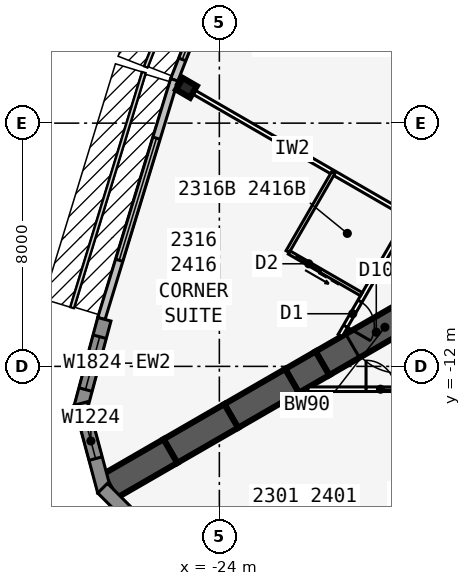
"""IFC4 building model, lengths in metres.
Left out: names, types, materials, properties, quantities, classifications, styles, units other than length and angle.
Written with IfcOpenShell. Run it as: python <this file> out.ifc"""

import sys

from ifc_helpers import new_model, si_unit, direction, frame, frame_2d, origin, origin_2d, place, context, subcontext, project, spatial, polyline, rectangle, i_section, outline, extrude, element, fill, save


model = new_model("IFC4")
c1 = context("Model", 3, precision=1e-05, world=origin(), true_north=direction((0.0, 1.0)))
c2 = subcontext(c1, "Body", "Model", "MODEL_VIEW")
j1 = project(units=[si_unit("LENGTHUNIT", "METRE"), si_unit("PLANEANGLEUNIT", "RADIAN")], contexts=[c1])
p1 = place(None, origin())
s1 = spatial("IfcSite", under=j1, at=p1, CompositionType="ELEMENT")
p2 = place(p1, origin())
s2 = spatial("IfcBuilding", under=s1, at=p2, CompositionType="ELEMENT")
p3 = place(p2, frame((0.0, 0.0, 89.7)))
s3 = spatial("IfcBuildingStorey", under=s2, at=p3, CompositionType="ELEMENT", Elevation=89.7)
p4 = place(p3, frame((-16.5, -9.526, 0.0), z_axis=(0.0, 0.0, 1.0), x_axis=(-0.866031398331, -0.499989616998, 0.0)))
e1 = element("IfcWall", 1, at=p4, inside=s3, PredefinedType="SHEAR", context=c2, shape_type="SweptSolid", body=[
    extrude(rectangle(XDim=4.746, YDim=0.9, at=frame_2d((2.373, 0.0))), origin(), (0.0, 0.0, 1.0), 3.4),
])
p5 = place(p4, frame((1.8, 0.0, 0.0)))
e2 = element("IfcOpeningElement", 2, at=p5, cuts=e1, PredefinedType="OPENING", context=c2, shape_type="SweptSolid", body=[
    extrude(rectangle(XDim=1.8, YDim=2.13, at=frame_2d((0.9, 1.065))), frame((0.0, 0.46, 0.0), z_axis=(0.0, -1.0, 0.0), x_axis=(1.0, 0.0, 0.0)), (0.0, 0.0, 1.0), 0.92),
])
p6 = place(p3, frame((-20.61, -11.899, 0.0), z_axis=(0.0, 0.0, 1.0), x_axis=(-0.866009537788, -0.500027479704, 0.0)))
e3 = element("IfcWall", 3, at=p6, inside=s3, PredefinedType="SHEAR", context=c2, shape_type="SweptSolid", body=[
    extrude(rectangle(XDim=1.155, YDim=0.9, at=frame_2d((0.577, 0.0))), origin(), (0.0, 0.0, 1.0), 3.4),
])
for number, where, z_axis, x_axis in (
    (4, (-21.61, -12.477, 0.0), (0.0, 0.0, 1.0), (-0.866, -0.5, 0.0)),
    (5, (-23.61, -13.631, 0.0), (0.0, 0.0, 1.0), (-0.866, -0.5, 0.0)),
    (6, (-25.61, -14.786, 0.0), (0.0, 0.0, 1.0), (-0.866, -0.5, 0.0)),
):
    element("IfcWall", number, at=place(p3, frame(where, z_axis=z_axis, x_axis=x_axis)), inside=s3, PredefinedType="SHEAR", context=c2, shape_type="SweptSolid", body=[
        extrude(rectangle(XDim=2.309, YDim=0.9, at=frame_2d((1.155, 0.0))), origin(), (0.0, 0.0, 1.0), 3.4),
    ])
p7 = place(p3, frame((-25.083, -2.839, 0.0), z_axis=(0.0, 0.0, 1.0), x_axis=(-0.5, -0.866025403784, 0.0)))
e7 = element("IfcColumn", 7, at=p7, inside=s3, PredefinedType="COLUMN", context=c2, shape_type="SweptSolid", body=[
    extrude(i_section(OverallWidth=0.442, OverallDepth=0.531, WebThickness=0.066, FlangeThickness=0.106, at=origin_2d()), origin(), (0.0, 0.0, 1.0), 3.4),
])
p8 = place(p3, frame((-23.645, 2.126, 0.0), z_axis=(0.0, 0.0, 1.0), x_axis=(-0.364013463868, -0.931393685894, 0.0)))
e8 = element("IfcWall", 8, at=p8, inside=s3, PredefinedType="STANDARD", context=c2, shape_type="SweptSolid", body=[
    extrude(rectangle(XDim=5.058, YDim=0.25, at=frame_2d((2.529, 0.0))), origin(), (0.0, 0.0, 1.0), 3.235),
])
p9 = place(p8, frame((0.729, 0.0, 0.45)))
e9 = element("IfcOpeningElement", 9, at=p9, cuts=e8, PredefinedType="OPENING", context=c2, shape_type="SweptSolid", body=[
    extrude(rectangle(XDim=3.6, YDim=2.4, at=frame_2d((1.8, 1.2))), frame((0.0, 0.135, 0.0), z_axis=(0.0, -1.0, 0.0), x_axis=(1.0, 0.0, 0.0)), (0.0, 0.0, 1.0), 0.27),
])
p10 = place(p3, frame((-25.483, -2.575, 0.0), z_axis=(0.0, 0.0, 1.0), x_axis=(-0.2919790669, -0.956424709265, 0.0)))
e10 = element("IfcWall", 10, at=p10, inside=s3, PredefinedType="STANDARD", context=c2, shape_type="SweptSolid", body=[
    extrude(rectangle(XDim=8.211, YDim=0.25, at=frame_2d((4.105, 0.0))), origin(), (0.0, 0.0, 1.0), 3.235),
])
p11 = place(p10, frame((2.006, 0.0, 0.45)))
e11 = element("IfcOpeningElement", 11, at=p11, cuts=e10, PredefinedType="OPENING", context=c2, shape_type="SweptSolid", body=[
    extrude(rectangle(XDim=4.2, YDim=2.4, at=frame_2d((2.1, 1.2))), frame((0.0, 0.135, 0.0), z_axis=(0.0, -1.0, 0.0), x_axis=(1.0, 0.0, 0.0)), (0.0, 0.0, 1.0), 0.27),
])
p12 = place(p3, frame((-27.783, -10.45, 0.0), z_axis=(0.0, 0.0, 1.0), x_axis=(-0.258780998834, -0.965936019953, 0.0)))
e12 = element("IfcWall", 12, at=p12, inside=s3, PredefinedType="SOLIDWALL", context=c2, shape_type="SweptSolid", body=[
    extrude(rectangle(XDim=2.989, YDim=0.45, at=frame_2d((1.494, 0.0))), origin(), (0.0, 0.0, 1.0), 3.235),
])
p13 = place(p12, frame((0.594, 0.0, 0.45)))
e13 = element("IfcOpeningElement", 13, at=p13, cuts=e12, PredefinedType="OPENING", context=c2, shape_type="SweptSolid", body=[
    extrude(rectangle(XDim=1.8, YDim=2.4, at=frame_2d((0.9, 1.2))), frame((0.0, 0.235, 0.0), z_axis=(0.0, -1.0, 0.0), x_axis=(1.0, 0.0, 0.0)), (0.0, 0.0, 1.0), 0.47),
])
p14 = place(p3, frame((-28.556, -13.221, 0.0), z_axis=(0.0, 0.0, 1.0), x_axis=(0.258801419081, -0.965930548995, 0.0)))
e14 = element("IfcWall", 14, at=p14, inside=s3, PredefinedType="SOLIDWALL", context=c2, shape_type="SweptSolid", body=[
    extrude(outline(polyline([(2.989, 0.225), (2.929, 0.225), (2.437, 0.093), (2.402, 0.225), (0.0, 0.225), (0.0, -0.225), (2.989, -0.225), (2.989, 0.225)])), origin(), (0.0, 0.0, 1.0), 3.235),
])
p15 = place(p14, frame((0.676, 0.0, 0.45)))
e15 = element("IfcOpeningElement", 15, at=p15, cuts=e14, PredefinedType="OPENING", context=c2, shape_type="SweptSolid", body=[
    extrude(rectangle(XDim=1.2, YDim=2.4, at=frame_2d((0.6, 1.2))), frame((0.0, 0.235, 0.0), z_axis=(0.0, -1.0, 0.0), x_axis=(1.0, 0.0, 0.0)), (0.0, 0.0, 1.0), 0.47),
])
p16 = place(p3, frame((-27.841, -16.007, 0.0), z_axis=(0.0, 0.0, 1.0), x_axis=(0.707025086683, -0.707188466253, 0.0)))
e16 = element("IfcWall", 16, at=p16, inside=s3, PredefinedType="SOLIDWALL", context=c2, shape_type="SweptSolid", body=[
    extrude(outline(polyline([(2.989, 0.225), (0.586, 0.225), (0.551, 0.093), (0.059, 0.225), (0.0, 0.225), (0.0, -0.225), (2.989, -0.225), (2.989, 0.225)])), origin(), (0.0, 0.0, 1.0), 3.235),
])
p17 = place(p16, frame((1.113, 0.0, 0.45)))
e17 = element("IfcOpeningElement", 17, at=p17, cuts=e16, PredefinedType="OPENING", context=c2, shape_type="SweptSolid", body=[
    extrude(rectangle(XDim=1.2, YDim=2.4, at=frame_2d((0.6, 1.2))), frame((0.0, 0.235, 0.0), z_axis=(0.0, -1.0, 0.0), x_axis=(1.0, 0.0, 0.0)), (0.0, 0.0, 1.0), 0.47),
])
p18 = place(p3, frame((-21.086, -12.751, 0.0), z_axis=(0.0, 0.0, 1.0), x_axis=(1.0, 0.0, 0.0)))
e18 = element("IfcWall", 18, at=p18, inside=s3, PredefinedType="PARTITIONING", context=c2, shape_type="SweptSolid", body=[
    extrude(rectangle(XDim=42.172, YDim=0.15, at=frame_2d((21.086, 0.0))), origin(), (0.0, 0.0, 1.0), 3.235),
])
p19 = place(p18, frame((1.911, 0.0, 0.0)))
e19 = element("IfcOpeningElement", 19, at=p19, cuts=e18, PredefinedType="OPENING", context=c2, shape_type="SweptSolid", body=[
    extrude(rectangle(XDim=0.95, YDim=2.13, at=frame_2d((0.475, 1.065))), frame((0.0, 0.085, 0.0), z_axis=(0.0, -1.0, 0.0), x_axis=(1.0, 0.0, 0.0)), (0.0, 0.0, 1.0), 0.17),
])
p20 = place(p18, frame((11.911, 0.0, 0.0)))
e20 = element("IfcOpeningElement", 20, at=p20, cuts=e18, PredefinedType="OPENING", context=c2, shape_type="SweptSolid", body=[
    extrude(rectangle(XDim=0.95, YDim=2.13, at=frame_2d((0.475, 1.065))), frame((0.0, 0.085, 0.0), z_axis=(0.0, -1.0, 0.0), x_axis=(1.0, 0.0, 0.0)), (0.0, 0.0, 1.0), 0.17),
])
p21 = place(p18, frame((18.711, 0.0, 0.0)))
e21 = element("IfcOpeningElement", 21, at=p21, cuts=e18, PredefinedType="OPENING", context=c2, shape_type="SweptSolid", body=[
    extrude(rectangle(XDim=0.95, YDim=2.13, at=frame_2d((0.475, 1.065))), frame((0.0, 0.085, 0.0), z_axis=(0.0, -1.0, 0.0), x_axis=(1.0, 0.0, 0.0)), (0.0, 0.0, 1.0), 0.17),
])
p22 = place(p18, frame((23.086, 0.0, 0.0)))
e22 = element("IfcOpeningElement", 22, at=p22, cuts=e18, PredefinedType="OPENING", context=c2, shape_type="SweptSolid", body=[
    extrude(rectangle(XDim=1.0, YDim=2.13, at=frame_2d((0.5, 1.065))), frame((0.0, 0.085, 0.0), z_axis=(0.0, -1.0, 0.0), x_axis=(1.0, 0.0, 0.0)), (0.0, 0.0, 1.0), 0.17),
])
p23 = place(p18, frame((27.511, 0.0, 0.0)))
e23 = element("IfcOpeningElement", 23, at=p23, cuts=e18, PredefinedType="OPENING", context=c2, shape_type="SweptSolid", body=[
    extrude(rectangle(XDim=0.95, YDim=2.13, at=frame_2d((0.475, 1.065))), frame((0.0, 0.085, 0.0), z_axis=(0.0, -1.0, 0.0), x_axis=(1.0, 0.0, 0.0)), (0.0, 0.0, 1.0), 0.17),
])
p24 = place(p18, frame((33.711, 0.0, 0.0)))
e24 = element("IfcOpeningElement", 24, at=p24, cuts=e18, PredefinedType="OPENING", context=c2, shape_type="SweptSolid", body=[
    extrude(rectangle(XDim=0.95, YDim=2.13, at=frame_2d((0.475, 1.065))), frame((0.0, 0.085, 0.0), z_axis=(0.0, -1.0, 0.0), x_axis=(1.0, 0.0, 0.0)), (0.0, 0.0, 1.0), 0.17),
])
p25 = place(p18, frame((39.311, 0.0, 0.0)))
e25 = element("IfcOpeningElement", 25, at=p25, cuts=e18, PredefinedType="OPENING", context=c2, shape_type="SweptSolid", body=[
    extrude(rectangle(XDim=0.95, YDim=2.13, at=frame_2d((0.475, 1.065))), frame((0.0, 0.085, 0.0), z_axis=(0.0, -1.0, 0.0), x_axis=(1.0, 0.0, 0.0)), (0.0, 0.0, 1.0), 0.17),
])
p26 = place(p3, frame((-0.5, 22.836, 0.0), z_axis=(0.0, 0.0, 1.0), x_axis=(-0.500001677587, -0.866024435227, 0.0)))
e26 = element("IfcWall", 26, at=p26, inside=s3, PredefinedType="PARTITIONING", context=c2, shape_type="SweptSolid", body=[
    extrude(rectangle(XDim=39.054, YDim=0.15, at=frame_2d((19.527, 0.0))), origin(), (0.0, 0.0, 1.0), 3.235),
])
p27 = place(p26, frame((0.352, 0.0, 0.0)))
e27 = element("IfcOpeningElement", 27, at=p27, cuts=e26, PredefinedType="OPENING", context=c2, shape_type="SweptSolid", body=[
    extrude(rectangle(XDim=0.95, YDim=2.13, at=frame_2d((0.475, 1.065))), frame((0.0, 0.085, 0.0), z_axis=(0.0, -1.0, 0.0), x_axis=(1.0, 0.0, 0.0)), (0.0, 0.0, 1.0), 0.17),
])
p28 = place(p26, frame((6.552, 0.0, 0.0)))
e28 = element("IfcOpeningElement", 28, at=p28, cuts=e26, PredefinedType="OPENING", context=c2, shape_type="SweptSolid", body=[
    extrude(rectangle(XDim=0.95, YDim=2.13, at=frame_2d((0.475, 1.065))), frame((0.0, 0.085, 0.0), z_axis=(0.0, -1.0, 0.0), x_axis=(1.0, 0.0, 0.0)), (0.0, 0.0, 1.0), 0.17),
])
p29 = place(p26, frame((20.352, 0.0, 0.0)))
e29 = element("IfcOpeningElement", 29, at=p29, cuts=e26, PredefinedType="OPENING", context=c2, shape_type="SweptSolid", body=[
    extrude(rectangle(XDim=0.95, YDim=2.13, at=frame_2d((0.475, 1.065))), frame((0.0, 0.085, 0.0), z_axis=(0.0, -1.0, 0.0), x_axis=(1.0, 0.0, 0.0)), (0.0, 0.0, 1.0), 0.17),
])
p30 = place(p26, frame((27.752, 0.0, 0.0)))
e30 = element("IfcOpeningElement", 30, at=p30, cuts=e26, PredefinedType="OPENING", context=c2, shape_type="SweptSolid", body=[
    extrude(rectangle(XDim=0.95, YDim=2.13, at=frame_2d((0.475, 1.065))), frame((0.0, 0.085, 0.0), z_axis=(0.0, -1.0, 0.0), x_axis=(1.0, 0.0, 0.0)), (0.0, 0.0, 1.0), 0.17),
])
p31 = place(p26, frame((37.752, 0.0, 0.0)))
e31 = element("IfcOpeningElement", 31, at=p31, cuts=e26, PredefinedType="OPENING", context=c2, shape_type="SweptSolid", body=[
    extrude(rectangle(XDim=0.95, YDim=2.13, at=frame_2d((0.475, 1.065))), frame((0.0, 0.085, 0.0), z_axis=(0.0, -1.0, 0.0), x_axis=(1.0, 0.0, 0.0)), (0.0, 0.0, 1.0), 0.17),
])
p32 = place(p3, frame((-17.829, -7.027, 0.0), z_axis=(0.0, 0.0, 1.0), x_axis=(-0.866032659912, 0.499987431809, 0.0)))
e32 = element("IfcWall", 32, at=p32, inside=s3, PredefinedType="PARTITIONING", context=c2, shape_type="SweptSolid", body=[
    extrude(rectangle(XDim=8.72, YDim=0.15, at=frame_2d((4.36, 0.0))), origin(), (0.0, 0.0, 1.0), 2.389),
])
p33 = place(p3, frame((-20.253, -5.627, 0.0), z_axis=(0.0, 0.0, 1.0), x_axis=(-0.499990139034, -0.866031096941, 0.0)))
e33 = element("IfcWall", 33, at=p33, inside=s3, PredefinedType="PLUMBINGWALL", context=c2, shape_type="SweptSolid", body=[
    extrude(rectangle(XDim=3.0, YDim=0.12, at=frame_2d((1.5, 0.0))), origin(), (0.0, 0.0, 1.0), 3.235),
])
p34 = place(p3, frame((-19.329, -9.625, 0.0), z_axis=(0.0, 0.0, 1.0), x_axis=(-0.866035715982, 0.499982138324, 0.0)))
e34 = element("IfcWall", 34, at=p34, inside=s3, PredefinedType="PLUMBINGWALL", context=c2, shape_type="SweptSolid", body=[
    extrude(rectangle(XDim=2.74, YDim=0.12, at=frame_2d((1.37, 0.0))), origin(), (0.0, 0.0, 1.0), 3.235),
])
p35 = place(p34, frame((1.55, 0.0, 0.0)))
e35 = element("IfcOpeningElement", 35, at=p35, cuts=e34, PredefinedType="OPENING", context=c2, shape_type="SweptSolid", body=[
    extrude(rectangle(XDim=0.9, YDim=2.13, at=frame_2d((0.45, 1.065))), frame((0.0, 0.07, 0.0), z_axis=(0.0, -1.0, 0.0), x_axis=(1.0, 0.0, 0.0)), (0.0, 0.0, 1.0), 0.14),
])
p36 = place(p9, origin())
e36 = element("IfcWindow", 36, at=p36, inside=s3, PartitioningType="SINGLE_PANEL", PredefinedType="WINDOW", context=c2, shape_type="SweptSolid", body=[
    extrude(rectangle(XDim=3.6, YDim=2.4, at=frame_2d((1.8, 1.2))), frame((0.0, 0.03, 0.0), z_axis=(0.0, -1.0, 0.0), x_axis=(1.0, 0.0, 0.0)), (0.0, 0.0, 1.0), 0.06),
])
fill(e9, e36)
p37 = place(p11, origin())
e37 = element("IfcWindow", 37, at=p37, inside=s3, PartitioningType="SINGLE_PANEL", PredefinedType="WINDOW", context=c2, shape_type="SweptSolid", body=[
    extrude(rectangle(XDim=4.2, YDim=2.4, at=frame_2d((2.1, 1.2))), frame((0.0, 0.03, 0.0), z_axis=(0.0, -1.0, 0.0), x_axis=(1.0, 0.0, 0.0)), (0.0, 0.0, 1.0), 0.06),
])
fill(e11, e37)
p38 = place(p13, origin())
e38 = element("IfcWindow", 38, at=p38, inside=s3, PartitioningType="SINGLE_PANEL", PredefinedType="WINDOW", context=c2, shape_type="SweptSolid", body=[
    extrude(rectangle(XDim=1.8, YDim=2.4, at=frame_2d((0.9, 1.2))), frame((0.0, 0.03, 0.0), z_axis=(0.0, -1.0, 0.0), x_axis=(1.0, 0.0, 0.0)), (0.0, 0.0, 1.0), 0.06),
])
fill(e13, e38)
p39 = place(p15, origin())
e39 = element("IfcWindow", 39, at=p39, inside=s3, PartitioningType="SINGLE_PANEL", PredefinedType="WINDOW", context=c2, shape_type="SweptSolid", body=[
    extrude(rectangle(XDim=1.2, YDim=2.4, at=frame_2d((0.6, 1.2))), frame((0.0, 0.03, 0.0), z_axis=(0.0, -1.0, 0.0), x_axis=(1.0, 0.0, 0.0)), (0.0, 0.0, 1.0), 0.06),
])
fill(e15, e39)
p40 = place(p19, origin())
e40 = element("IfcDoor", 40, at=p40, inside=s3, OperationType="SINGLE_SWING_LEFT", PredefinedType="DOOR", context=c2, shape_type="SweptSolid", body=[
    extrude(rectangle(XDim=0.95, YDim=2.13, at=frame_2d((0.475, 1.065))), frame((0.0, 0.025, 0.0), z_axis=(0.0, -1.0, 0.0), x_axis=(1.0, 0.0, 0.0)), (0.0, 0.0, 1.0), 0.05),
])
fill(e19, e40)
p41 = place(p35, origin())
e41 = element("IfcDoor", 41, at=p41, inside=s3, OperationType="SLIDING_TO_LEFT", PredefinedType="DOOR", context=c2, shape_type="SweptSolid", body=[
    extrude(rectangle(XDim=0.9, YDim=2.13, at=frame_2d((0.45, 1.065))), frame((0.0, 0.025, 0.0), z_axis=(0.0, -1.0, 0.0), x_axis=(1.0, 0.0, 0.0)), (0.0, 0.0, 1.0), 0.05),
])
fill(e35, e41)
p42 = place(p31, origin())
e42 = element("IfcDoor", 42, at=p42, inside=s3, OperationType="SINGLE_SWING_RIGHT", PredefinedType="DOOR", context=c2, shape_type="SweptSolid", body=[
    extrude(rectangle(XDim=0.95, YDim=2.13, at=frame_2d((0.475, 1.065))), frame((0.0, 0.025, 0.0), z_axis=(0.0, -1.0, 0.0), x_axis=(1.0, 0.0, 0.0)), (0.0, 0.0, 1.0), 0.05),
])
fill(e31, e42)
p43 = place(p5, origin())
e43 = element("IfcDoor", 43, at=p43, inside=s3, OperationType="DOUBLE_DOOR_DOUBLE_SWING", PredefinedType="DOOR", context=c2, shape_type="SweptSolid", body=[
    extrude(rectangle(XDim=1.8, YDim=2.13, at=frame_2d((0.9, 1.065))), frame((0.0, 0.025, 0.0), z_axis=(0.0, -1.0, 0.0), x_axis=(1.0, 0.0, 0.0)), (0.0, 0.0, 1.0), 0.05),
])
fill(e2, e43)
save(model, sys.argv[1])
